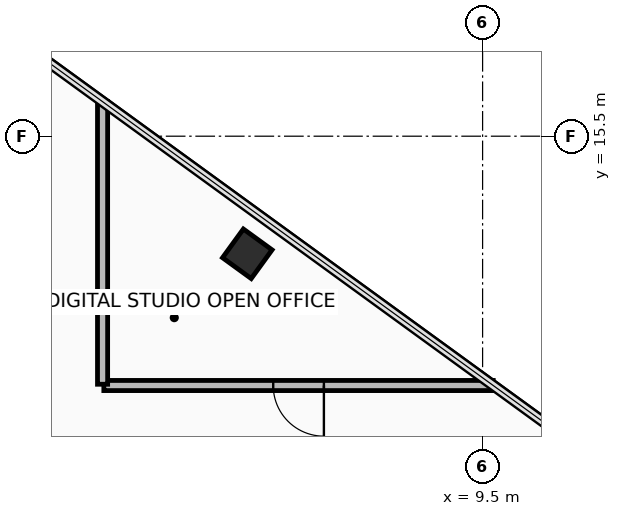
"""IFC4 building model, lengths in metres.
Left out: names, types, materials, properties, quantities, classifications, styles, units other than length and angle.
Written with IfcOpenShell. Run it as: python <this file> out.ifc"""

import sys

from ifc_helpers import new_model, si_unit, direction, frame, frame_2d, origin, origin_2d, place, context, subcontext, project, spatial, rectangle, hollow_rectangle, extrude, element, fill, save


model = new_model("IFC4")
c1 = context("Model", 3, precision=1e-05, world=origin(), true_north=direction((0.0, 1.0)))
c2 = subcontext(c1, "Body", "Model", "MODEL_VIEW")
j1 = project(units=[si_unit("LENGTHUNIT", "METRE"), si_unit("PLANEANGLEUNIT", "RADIAN")], contexts=[c1])
p1 = place(None, origin())
s1 = spatial("IfcSite", under=j1, at=p1, CompositionType="ELEMENT")
p2 = place(p1, origin())
s2 = spatial("IfcBuilding", under=s1, at=p2, CompositionType="ELEMENT")
p3 = place(p2, frame((0.0, 0.0, 112.45)))
s3 = spatial("IfcBuildingStorey", under=s2, at=p3, CompositionType="ELEMENT", Elevation=112.45)
p4 = place(p3, frame((4.856, 13.179, 0.0), z_axis=(0.0, 0.0, 1.0), x_axis=(-0.809016994375, 0.587785252292, 0.0)))
e1 = element("IfcColumn", 1, at=p4, inside=s3, PredefinedType="COLUMN", context=c2, shape_type="SweptSolid", body=[
    extrude(hollow_rectangle(XDim=0.7, YDim=0.7, WallThickness=0.04, at=origin_2d()), origin(), (0.0, 0.0, 1.0), 3.6),
])
p5 = place(p3, frame((9.71, 10.58, 0.0), z_axis=(0.0, 0.0, 1.0), x_axis=(-1.0, 0.0, 0.0)))
e2 = element("IfcWall", 2, at=p5, inside=s3, PredefinedType="PARTITIONING", context=c2, shape_type="SweptSolid", body=[
    extrude(rectangle(XDim=7.685, YDim=0.2, at=frame_2d((3.843, 0.0))), origin(), (0.0, 0.0, 1.0), 2.705),
])
p6 = place(p5, frame((3.342, 0.0, 0.0)))
e3 = element("IfcOpeningElement", 3, at=p6, cuts=e2, PredefinedType="OPENING", context=c2, shape_type="SweptSolid", body=[
    extrude(rectangle(XDim=1.0, YDim=2.15, at=frame_2d((0.5, 1.075))), frame((0.0, 0.11, 0.0), z_axis=(0.0, -1.0, 0.0), x_axis=(1.0, 0.0, 0.0)), (0.0, 0.0, 1.0), 0.22),
])
p7 = place(p3, frame((2.0, 10.605, 0.0), z_axis=(0.0, 0.0, 1.0), x_axis=(0.0, 1.0, 0.0)))
e4 = element("IfcWall", 4, at=p7, inside=s3, PredefinedType="PARTITIONING", context=c2, shape_type="SweptSolid", body=[
    extrude(rectangle(XDim=5.576, YDim=0.2, at=frame_2d((2.788, 0.0))), origin(), (0.0, 0.0, 1.0), 2.705),
])
p8 = place(p6, origin())
e5 = element("IfcDoor", 5, at=p8, inside=s3, OperationType="SINGLE_SWING_RIGHT", PredefinedType="DOOR", context=c2, shape_type="SweptSolid", body=[
    extrude(rectangle(XDim=1.0, YDim=2.15, at=frame_2d((0.5, 1.075))), frame((0.0, 0.025, 0.0), z_axis=(0.0, -1.0, 0.0), x_axis=(1.0, 0.0, 0.0)), (0.0, 0.0, 1.0), 0.05),
])
fill(e3, e5)
save(model, sys.argv[1])
